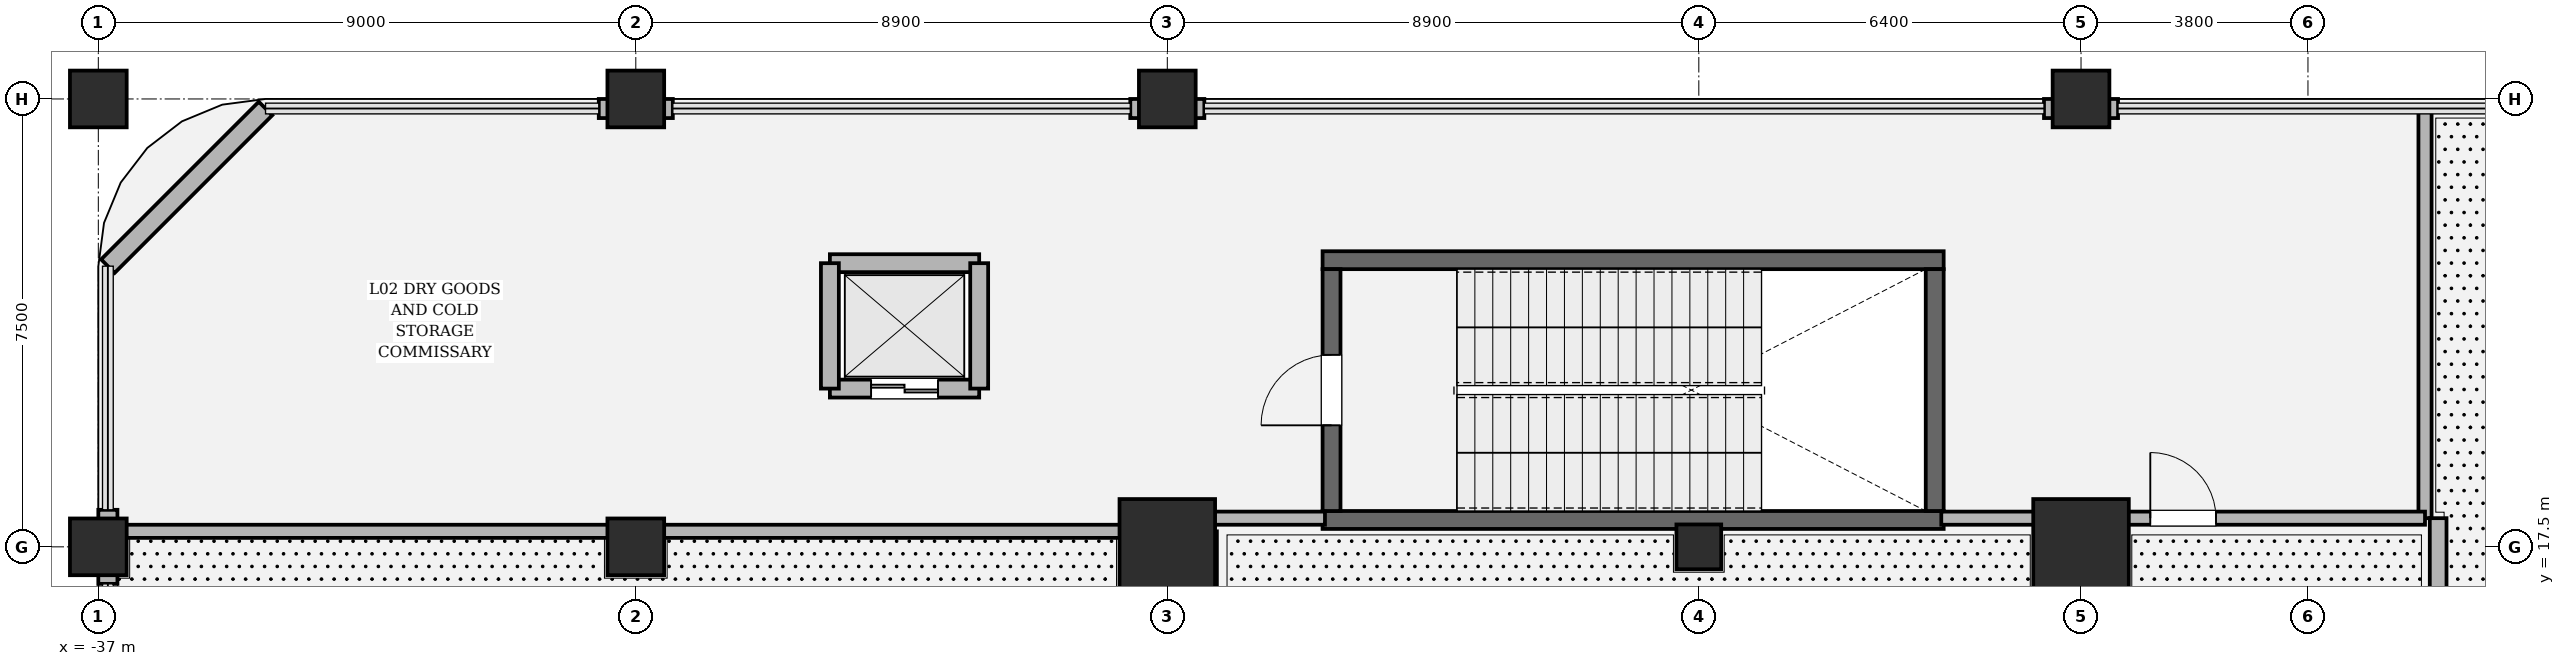
"""IFC4 building model, lengths in metres.
Left out: names, types, materials, properties, quantities, classifications, styles, units other than length and angle.
Written with IfcOpenShell. Run it as: python <this file> out.ifc"""

import sys

from ifc_helpers import new_model, si_unit, direction, frame, frame_2d, origin, origin_2d, place, context, subcontext, project, spatial, rectangle, hollow_rectangle, circle, extrude, element, fill, save


model = new_model("IFC4")
c1 = context("Model", 3, precision=1e-05, world=origin(), true_north=direction((0.0, 1.0)))
c2 = subcontext(c1, "Body", "Model", "MODEL_VIEW")
j1 = project(units=[si_unit("LENGTHUNIT", "METRE"), si_unit("PLANEANGLEUNIT", "RADIAN")], contexts=[c1])
p1 = place(None, origin())
s1 = spatial("IfcSite", under=j1, at=p1, CompositionType="ELEMENT")
p2 = place(p1, origin())
s2 = spatial("IfcBuilding", under=s1, at=p2, CompositionType="ELEMENT")
p3 = place(p2, frame((0.0, 0.0, 11.4)))
s3 = spatial("IfcBuildingStorey", under=s2, at=p3, CompositionType="ELEMENT", Elevation=11.4)
for number, where, z_axis, x_axis in (
    (1, (-16.5, 17.95, 0.0), (0.0, 0.0, 1.0), (1.0, 0.0, 0.0)),
    (2, (-6.1, 22.3, 0.0), (0.0, 0.0, 1.0), (-1.0, 0.0, 0.0)),
):
    element("IfcWall", number, at=place(p3, frame(where, z_axis=z_axis, x_axis=x_axis)), inside=s3, PredefinedType="SOLIDWALL", context=c2, shape_type="SweptSolid", body=[
        extrude(rectangle(XDim=10.4, YDim=0.3, at=frame_2d((5.2, 0.0))), origin(), (0.0, 0.0, 1.0), 5.4),
    ])
p4 = place(p3, frame((-16.35, 18.1, 0.0), z_axis=(0.0, 0.0, 1.0), x_axis=(0.0, 1.0, 0.0)))
e3 = element("IfcWall", 3, at=p4, inside=s3, PredefinedType="SOLIDWALL", context=c2, shape_type="SweptSolid", body=[
    extrude(rectangle(XDim=4.05, YDim=0.3, at=frame_2d((2.025, 0.0))), origin(), (0.0, 0.0, 1.0), 5.4),
])
p5 = place(p4, frame((1.435, 0.0, 0.0)))
e4 = element("IfcOpeningElement", 4, at=p5, cuts=e3, PredefinedType="OPENING", context=c2, shape_type="SweptSolid", body=[
    extrude(rectangle(XDim=1.18, YDim=2.2, at=frame_2d((0.59, 1.1))), frame((0.0, 0.16, 0.0), z_axis=(0.0, -1.0, 0.0), x_axis=(1.0, 0.0, 0.0)), (0.0, 0.0, 1.0), 0.32),
])
p6 = place(p3, frame((-6.25, 22.15, 0.0), z_axis=(0.0, 0.0, 1.0), x_axis=(0.0, -1.0, 0.0)))
e5 = element("IfcWall", 5, at=p6, inside=s3, PredefinedType="SOLIDWALL", context=c2, shape_type="SweptSolid", body=[
    extrude(rectangle(XDim=4.05, YDim=0.3, at=frame_2d((2.025, 0.0))), origin(), (0.0, 0.0, 1.0), 5.4),
])
for number, where, z_axis, x_axis in (
    (6, (-3.8, 17.5, 0.0), (0.0, 0.0, 1.0), (1.0, 0.0, 0.0)),
    (7, (-19.1, 17.5, 0.0), (0.0, 0.0, 1.0), (1.0, 0.0, 0.0)),
):
    element("IfcColumn", number, at=place(p3, frame(where, z_axis=z_axis, x_axis=x_axis)), inside=s3, PredefinedType="COLUMN", context=c2, shape_type="SweptSolid", body=[
        extrude(hollow_rectangle(XDim=1.6, YDim=1.6, WallThickness=0.05, at=origin_2d()), origin(), (0.0, 0.0, 1.0), 5.4),
    ])
for number, where, z_axis, x_axis in (
    (8, (-37.0, 17.5, 0.0), (0.0, 0.0, 1.0), (1.0, 0.0, 0.0)),
    (9, (-28.0, 17.5, 0.0), (0.0, 0.0, 1.0), (1.0, 0.0, 0.0)),
    (10, (-37.0, 25.0, 0.0), (0.0, 0.0, 1.0), (1.0, 0.0, 0.0)),
    (11, (-28.0, 25.0, 0.0), (0.0, 0.0, 1.0), (1.0, 0.0, 0.0)),
    (12, (-19.1, 25.0, 0.0), (0.0, 0.0, 1.0), (1.0, 0.0, 0.0)),
    (13, (-3.8, 25.0, 0.0), (0.0, 0.0, 1.0), (1.0, 0.0, 0.0)),
):
    element("IfcColumn", number, at=place(p3, frame(where, z_axis=z_axis, x_axis=x_axis)), inside=s3, PredefinedType="COLUMN", context=c2, shape_type="SweptSolid", body=[
        extrude(rectangle(XDim=0.95, YDim=0.95, at=origin_2d()), origin(), (0.0, 0.0, 1.0), 5.4),
    ])
p7 = place(p3, frame((-10.2, 17.5, 0.0), z_axis=(0.0, 0.0, 1.0), x_axis=(1.0, 0.0, 0.0)))
e14 = element("IfcColumn", 14, at=p7, inside=s3, PredefinedType="PILASTER", context=c2, shape_type="SweptSolid", body=[
    extrude(circle(Radius=0.375, at=origin_2d()), origin(), (0.0, 0.0, 1.0), 5.4),
])
p8 = place(p3, frame((-27.38, 24.84, 0.0), z_axis=(0.0, 0.0, 1.0), x_axis=(-1.0, 0.0, 0.0)))
e15 = element("IfcWall", 15, at=p8, inside=s3, PredefinedType="SOLIDWALL", context=c2, shape_type="SweptSolid", body=[
    extrude(rectangle(XDim=1.24, YDim=0.32, at=frame_2d((0.62, 0.0))), origin(), (0.0, 0.0, 1.0), 4.414),
])
for number, where, z_axis, x_axis in (
    (16, (-18.48, 24.84, 0.0), (0.0, 0.0, 1.0), (-1.0, 0.0, 0.0)),
    (17, (-3.18, 24.84, 0.0), (0.0, 0.0, 1.0), (-1.0, 0.0, 0.0)),
):
    element("IfcWall", number, at=place(p3, frame(where, z_axis=z_axis, x_axis=x_axis)), inside=s3, PredefinedType="SOLIDWALL", context=c2, shape_type="SweptSolid", body=[
        extrude(rectangle(XDim=1.24, YDim=0.32, at=frame_2d((0.62, 0.0))), origin(), (0.0, 0.0, 1.0), 4.414),
    ])
p9 = place(p3, frame((-36.84, 16.88, 0.0), z_axis=(0.0, 0.0, 1.0), x_axis=(0.0, 1.0, 0.0)))
e18 = element("IfcWall", 18, at=p9, inside=s3, PredefinedType="SOLIDWALL", context=c2, shape_type="SweptSolid", body=[
    extrude(rectangle(XDim=1.24, YDim=0.32, at=frame_2d((0.62, 0.0))), origin(), (0.0, 0.0, 1.0), 4.414),
])
p10 = place(p3, frame((-36.84, 22.2, 0.0), z_axis=(0.0, 0.0, 1.0), x_axis=(0.707106781187, 0.707106781187, 0.0)))
e19 = element("IfcWall", 19, at=p10, inside=s3, PredefinedType="SOLIDWALL", context=c2, shape_type="SweptSolid", body=[
    extrude(rectangle(XDim=3.734, YDim=0.32, at=frame_2d((1.867, 0.0))), origin(), (0.0, 0.0, 1.0), 4.564),
])
p11 = place(p3, frame((-24.75, 20.15, 0.0), z_axis=(0.0, 0.0, 1.0), x_axis=(1.0, 0.0, 0.0)))
e20 = element("IfcWall", 20, at=p11, inside=s3, PredefinedType="SOLIDWALL", context=c2, shape_type="SweptSolid", body=[
    extrude(rectangle(XDim=2.5, YDim=0.3, at=frame_2d((1.25, 0.0))), origin(), (0.0, 0.0, 1.0), 5.12),
])
p12 = place(p11, frame((0.69, 0.0, 0.0)))
e21 = element("IfcOpeningElement", 21, at=p12, cuts=e20, PredefinedType="OPENING", context=c2, shape_type="SweptSolid", body=[
    extrude(rectangle(XDim=1.12, YDim=2.25, at=frame_2d((0.56, 1.125))), frame((0.0, 0.16, 0.0), z_axis=(0.0, -1.0, 0.0), x_axis=(1.0, 0.0, 0.0)), (0.0, 0.0, 1.0), 0.32),
])
p13 = place(p3, frame((-24.75, 22.25, 0.0), z_axis=(0.0, 0.0, 1.0), x_axis=(1.0, 0.0, 0.0)))
e22 = element("IfcWall", 22, at=p13, inside=s3, PredefinedType="SOLIDWALL", context=c2, shape_type="SweptSolid", body=[
    extrude(rectangle(XDim=2.5, YDim=0.3, at=frame_2d((1.25, 0.0))), origin(), (0.0, 0.0, 1.0), 5.12),
])
for number, where, z_axis, x_axis in (
    (23, (-24.75, 20.15, 0.0), (0.0, 0.0, 1.0), (0.0, 1.0, 0.0)),
    (24, (-22.25, 20.15, 0.0), (0.0, 0.0, 1.0), (0.0, 1.0, 0.0)),
):
    element("IfcWall", number, at=place(p3, frame(where, z_axis=z_axis, x_axis=x_axis)), inside=s3, PredefinedType="SOLIDWALL", context=c2, shape_type="SweptSolid", body=[
        extrude(rectangle(XDim=2.1, YDim=0.3, at=frame_2d((1.05, 0.0))), origin(), (0.0, 0.0, 1.0), 5.12),
    ])
p14 = place(p3, frame((-36.78, 17.76, 0.0), z_axis=(0.0, 0.0, 1.0), x_axis=(1.0, 0.0, 0.0)))
e25 = element("IfcWall", 25, at=p14, inside=s3, PredefinedType="SOLIDWALL", context=c2, shape_type="SweptSolid", body=[
    extrude(rectangle(XDim=18.4, YDim=0.22, at=frame_2d((9.2, 0.0))), origin(), (0.0, 0.0, 1.0), 4.414),
])
p15 = place(p3, frame((-18.38, 17.76, 0.0), z_axis=(0.0, 0.0, 1.0), x_axis=(0.0, -1.0, 0.0)))
e26 = element("IfcWall", 26, at=p15, inside=s3, PredefinedType="SOLIDWALL", context=c2, shape_type="SweptSolid", body=[
    extrude(rectangle(XDim=11.58, YDim=0.22, at=frame_2d((5.79, 0.0))), origin(), (0.0, 0.0, 1.0), 4.414),
])
p16 = place(p15, frame((5.265, 0.0, 0.0)))
e27 = element("IfcOpeningElement", 27, at=p16, cuts=e26, PredefinedType="OPENING", context=c2, shape_type="SweptSolid", body=[
    extrude(rectangle(XDim=1.05, YDim=2.2, at=frame_2d((0.525, 1.1))), frame((0.0, 0.12, 0.0), z_axis=(0.0, -1.0, 0.0), x_axis=(1.0, 0.0, 0.0)), (0.0, 0.0, 1.0), 0.24),
])
p17 = place(p3, frame((1.96, 24.78, 0.0), z_axis=(0.0, 0.0, 1.0), x_axis=(0.0, -1.0, 0.0)))
e28 = element("IfcWall", 28, at=p17, inside=s3, PredefinedType="SOLIDWALL", context=c2, shape_type="SweptSolid", body=[
    extrude(rectangle(XDim=6.8, YDim=0.22, at=frame_2d((3.4, 0.0))), origin(), (0.0, 0.0, 1.0), 5.12),
])
p18 = place(p3, frame((1.96, 17.98, 0.0), z_axis=(0.0, 0.0, 1.0), x_axis=(-1.0, 0.0, 0.0)))
e29 = element("IfcWall", 29, at=p18, inside=s3, PredefinedType="SOLIDWALL", context=c2, shape_type="SweptSolid", body=[
    extrude(rectangle(XDim=8.1, YDim=0.22, at=frame_2d((4.05, 0.0))), origin(), (0.0, 0.0, 1.0), 4.414),
])
p19 = place(p18, frame((3.5, 0.0, 0.0)))
e30 = element("IfcOpeningElement", 30, at=p19, cuts=e29, PredefinedType="OPENING", context=c2, shape_type="SweptSolid", body=[
    extrude(rectangle(XDim=1.1, YDim=2.2, at=frame_2d((0.55, 1.1))), frame((0.0, 0.12, 0.0), z_axis=(0.0, -1.0, 0.0), x_axis=(1.0, 0.0, 0.0)), (0.0, 0.0, 1.0), 0.24),
])
p20 = place(p3, frame((-16.46, 17.98, 0.0), z_axis=(0.0, 0.0, 1.0), x_axis=(-1.0, 0.0, 0.0)))
e31 = element("IfcWall", 31, at=p20, inside=s3, PredefinedType="SOLIDWALL", context=c2, shape_type="SweptSolid", body=[
    extrude(rectangle(XDim=1.92, YDim=0.22, at=frame_2d((0.96, 0.0))), origin(), (0.0, 0.0, 1.0), 5.12),
])
p21 = place(p3, frame((2.18, 12.18, 0.0), z_axis=(0.0, 0.0, 1.0), x_axis=(0.0, 1.0, 0.0)))
e32 = element("IfcWall", 32, at=p21, inside=s3, PredefinedType="SOLIDWALL", context=c2, shape_type="SweptSolid", body=[
    extrude(rectangle(XDim=5.8, YDim=0.28, at=frame_2d((2.9, 0.0))), origin(), (0.0, 0.0, 1.0), 4.414),
])
p22 = place(p5, origin())
e33 = element("IfcDoor", 33, at=p22, inside=s3, OperationType="SINGLE_SWING_LEFT", PredefinedType="DOOR", context=c2, shape_type="SweptSolid", body=[
    extrude(rectangle(XDim=1.18, YDim=2.2, at=frame_2d((0.59, 1.1))), frame((0.0, 0.025, 0.0), z_axis=(0.0, -1.0, 0.0), x_axis=(1.0, 0.0, 0.0)), (0.0, 0.0, 1.0), 0.05),
])
fill(e4, e33)
p23 = place(p12, origin())
e34 = element("IfcDoor", 34, at=p23, inside=s3, OperationType="DOUBLE_DOOR_SLIDING", PredefinedType="DOOR", context=c2, shape_type="SweptSolid", body=[
    extrude(rectangle(XDim=1.12, YDim=2.25, at=frame_2d((0.56, 1.125))), frame((0.0, 0.025, 0.0), z_axis=(0.0, -1.0, 0.0), x_axis=(1.0, 0.0, 0.0)), (0.0, 0.0, 1.0), 0.05),
])
fill(e21, e34)
p24 = place(p19, origin())
e35 = element("IfcDoor", 35, at=p24, inside=s3, OperationType="SINGLE_SWING_RIGHT", PredefinedType="DOOR", context=c2, shape_type="SweptSolid", body=[
    extrude(rectangle(XDim=1.1, YDim=2.2, at=frame_2d((0.55, 1.1))), frame((0.0, 0.025, 0.0), z_axis=(0.0, -1.0, 0.0), x_axis=(1.0, 0.0, 0.0)), (0.0, 0.0, 1.0), 0.05),
])
fill(e30, e35)
save(model, sys.argv[1])
